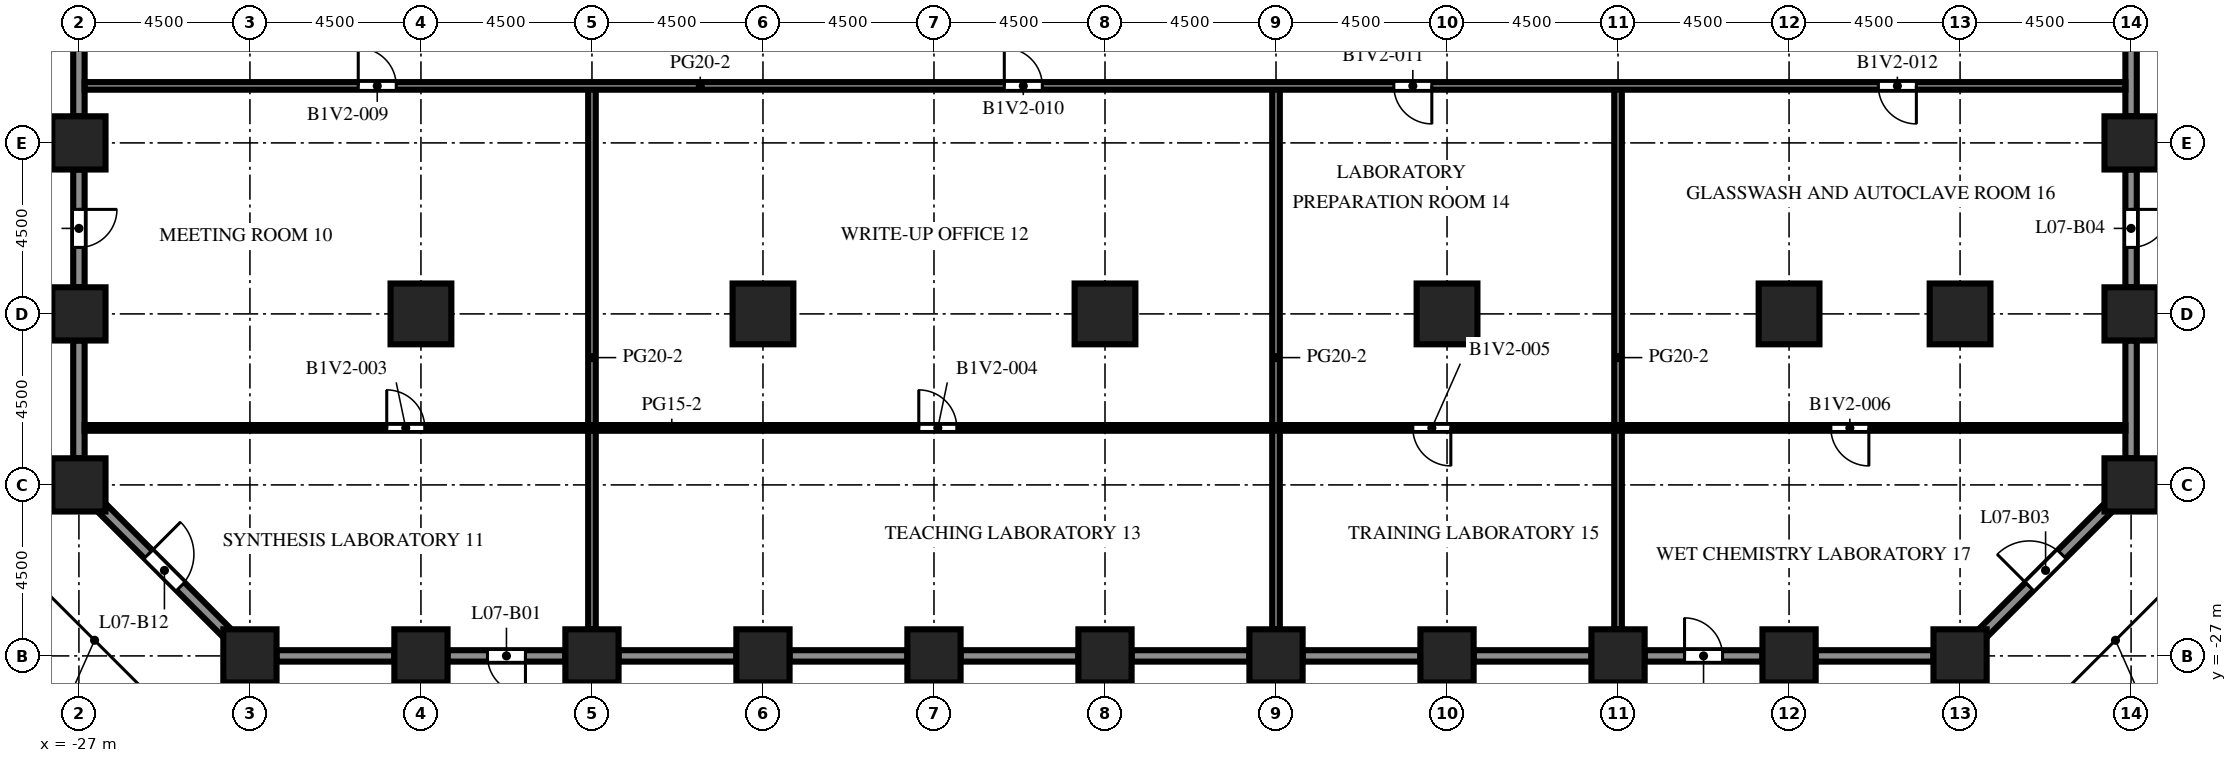
"""IFC4 building model, lengths in metres.
Left out: names, types, materials, properties, quantities, classifications, styles, units other than length and angle.
Written with IfcOpenShell. Run it as: python <this file> out.ifc"""

import sys

from ifc_helpers import new_model, si_unit, direction, frame, frame_2d, origin, origin_2d, place, context, subcontext, project, spatial, rectangle, extrude, element, fill, save


model = new_model("IFC4")
c1 = context("Model", 3, precision=1e-05, world=origin(), true_north=direction((0.0, 1.0)))
c2 = subcontext(c1, "Body", "Model", "MODEL_VIEW")
j1 = project(units=[si_unit("LENGTHUNIT", "METRE"), si_unit("PLANEANGLEUNIT", "RADIAN")], contexts=[c1])
p1 = place(None, origin())
s1 = spatial("IfcSite", under=j1, at=p1, CompositionType="ELEMENT")
p2 = place(p1, origin())
s2 = spatial("IfcBuilding", under=s1, at=p2, CompositionType="ELEMENT")
p3 = place(p2, frame((0.0, 0.0, 31.8)))
s3 = spatial("IfcBuildingStorey", under=s2, at=p3, CompositionType="ELEMENT", Elevation=31.8)
for number, where, z_axis, x_axis in (
    (1, (-27.0, -22.5, 0.0), (0.0, 0.0, 1.0), (1.0, 0.0, 0.0)),
    (2, (-27.0, -18.0, 0.0), (0.0, 0.0, 1.0), (1.0, 0.0, 0.0)),
    (3, (-27.0, -13.5, 0.0), (0.0, 0.0, 1.0), (1.0, 0.0, 0.0)),
    (4, (-22.5, -27.0, 0.0), (0.0, 0.0, 1.0), (1.0, 0.0, 0.0)),
    (5, (-18.0, -27.0, 0.0), (0.0, 0.0, 1.0), (1.0, 0.0, 0.0)),
    (6, (-13.5, -27.0, 0.0), (0.0, 0.0, 1.0), (1.0, 0.0, 0.0)),
    (7, (-9.0, -27.0, 0.0), (0.0, 0.0, 1.0), (1.0, 0.0, 0.0)),
    (8, (-4.5, -27.0, 0.0), (0.0, 0.0, 1.0), (1.0, 0.0, 0.0)),
    (9, (0.0, -27.0, 0.0), (0.0, 0.0, 1.0), (1.0, 0.0, 0.0)),
    (10, (4.5, -27.0, 0.0), (0.0, 0.0, 1.0), (1.0, 0.0, 0.0)),
    (11, (9.0, -27.0, 0.0), (0.0, 0.0, 1.0), (1.0, 0.0, 0.0)),
    (12, (13.5, -27.0, 0.0), (0.0, 0.0, 1.0), (1.0, 0.0, 0.0)),
    (13, (18.0, -27.0, 0.0), (0.0, 0.0, 1.0), (1.0, 0.0, 0.0)),
    (14, (22.5, -27.0, 0.0), (0.0, 0.0, 1.0), (1.0, 0.0, 0.0)),
    (15, (27.0, -22.5, 0.0), (0.0, 0.0, 1.0), (1.0, 0.0, 0.0)),
    (16, (27.0, -18.0, 0.0), (0.0, 0.0, 1.0), (1.0, 0.0, 0.0)),
    (17, (27.0, -13.5, 0.0), (0.0, 0.0, 1.0), (1.0, 0.0, 0.0)),
):
    element("IfcColumn", number, at=place(p3, frame(where, z_axis=z_axis, x_axis=x_axis)), inside=s3, PredefinedType="COLUMN", context=c2, shape_type="SweptSolid", body=[
        extrude(rectangle(XDim=1.4, YDim=1.4, at=origin_2d()), origin(), (0.0, 0.0, 1.0), 4.1),
    ])
for number, where, z_axis, x_axis in (
    (18, (-18.0, -18.0, 0.0), (0.0, 0.0, 1.0), (1.0, 0.0, 0.0)),
    (19, (-9.0, -18.0, 0.0), (0.0, 0.0, 1.0), (1.0, 0.0, 0.0)),
    (20, (0.0, -18.0, 0.0), (0.0, 0.0, 1.0), (1.0, 0.0, 0.0)),
    (21, (9.0, -18.0, 0.0), (0.0, 0.0, 1.0), (1.0, 0.0, 0.0)),
    (22, (18.0, -18.0, 0.0), (0.0, 0.0, 1.0), (1.0, 0.0, 0.0)),
    (23, (22.5, -18.0, 0.0), (0.0, 0.0, 1.0), (1.0, 0.0, 0.0)),
):
    element("IfcColumn", number, at=place(p3, frame(where, z_axis=z_axis, x_axis=x_axis)), inside=s3, PredefinedType="COLUMN", context=c2, shape_type="SweptSolid", body=[
        extrude(rectangle(XDim=1.6, YDim=1.6, at=origin_2d()), origin(), (0.0, 0.0, 1.0), 4.1),
    ])
p4 = place(p3, frame((-18.7, -27.0, 0.0), z_axis=(0.0, 0.0, 1.0), x_axis=(-1.0, 0.0, 0.0)))
e24 = element("IfcWall", 24, at=p4, inside=s3, PredefinedType="SOLIDWALL", context=c2, shape_type="SweptSolid", body=[
    extrude(rectangle(XDim=3.1, YDim=0.3, at=frame_2d((1.55, 0.0))), origin(), (0.0, 0.0, 1.0), 2.6),
])
p5 = place(p3, frame((-14.2, -27.0, 0.0), z_axis=(0.0, 0.0, 1.0), x_axis=(-1.0, 0.0, 0.0)))
e25 = element("IfcWall", 25, at=p5, inside=s3, PredefinedType="SOLIDWALL", context=c2, shape_type="SweptSolid", body=[
    extrude(rectangle(XDim=3.1, YDim=0.3, at=frame_2d((1.55, 0.0))), origin(), (0.0, 0.0, 1.0), 2.6),
])
p6 = place(p5, frame((1.05, 0.0, 0.0)))
e26 = element("IfcOpeningElement", 26, at=p6, cuts=e25, PredefinedType="OPENING", context=c2, shape_type="SweptSolid", body=[
    extrude(rectangle(XDim=1.0, YDim=2.2, at=frame_2d((0.5, 1.1))), frame((0.0, 0.16, 0.0), z_axis=(0.0, -1.0, 0.0), x_axis=(1.0, 0.0, 0.0)), (0.0, 0.0, 1.0), 0.32),
])
for number, where, z_axis, x_axis in (
    (27, (-9.7, -27.0, 0.0), (0.0, 0.0, 1.0), (-1.0, 0.0, 0.0)),
    (28, (-5.2, -27.0, 0.0), (0.0, 0.0, 1.0), (-1.0, 0.0, 0.0)),
    (29, (-0.7, -27.0, 0.0), (0.0, 0.0, 1.0), (-1.0, 0.0, 0.0)),
    (30, (3.8, -27.0, 0.0), (0.0, 0.0, 1.0), (-1.0, 0.0, 0.0)),
    (31, (8.3, -27.0, 0.0), (0.0, 0.0, 1.0), (-1.0, 0.0, 0.0)),
    (32, (12.8, -27.0, 0.0), (0.0, 0.0, 1.0), (-1.0, 0.0, 0.0)),
):
    element("IfcWall", number, at=place(p3, frame(where, z_axis=z_axis, x_axis=x_axis)), inside=s3, PredefinedType="SOLIDWALL", context=c2, shape_type="SweptSolid", body=[
        extrude(rectangle(XDim=3.1, YDim=0.3, at=frame_2d((1.55, 0.0))), origin(), (0.0, 0.0, 1.0), 2.6),
    ])
p7 = place(p3, frame((17.3, -27.0, 0.0), z_axis=(0.0, 0.0, 1.0), x_axis=(-1.0, 0.0, 0.0)))
e33 = element("IfcWall", 33, at=p7, inside=s3, PredefinedType="SOLIDWALL", context=c2, shape_type="SweptSolid", body=[
    extrude(rectangle(XDim=3.1, YDim=0.3, at=frame_2d((1.55, 0.0))), origin(), (0.0, 0.0, 1.0), 2.6),
])
p8 = place(p7, frame((1.05, 0.0, 0.0)))
e34 = element("IfcOpeningElement", 34, at=p8, cuts=e33, PredefinedType="OPENING", context=c2, shape_type="SweptSolid", body=[
    extrude(rectangle(XDim=1.0, YDim=2.2, at=frame_2d((0.5, 1.1))), frame((0.0, 0.16, 0.0), z_axis=(0.0, -1.0, 0.0), x_axis=(1.0, 0.0, 0.0)), (0.0, 0.0, 1.0), 0.32),
])
p9 = place(p3, frame((21.8, -27.0, 0.0), z_axis=(0.0, 0.0, 1.0), x_axis=(-1.0, 0.0, 0.0)))
e35 = element("IfcWall", 35, at=p9, inside=s3, PredefinedType="SOLIDWALL", context=c2, shape_type="SweptSolid", body=[
    extrude(rectangle(XDim=3.1, YDim=0.3, at=frame_2d((1.55, 0.0))), origin(), (0.0, 0.0, 1.0), 2.6),
])
p10 = place(p3, frame((26.406, -23.094, 0.0), z_axis=(0.0, 0.0, 1.0), x_axis=(-0.707106781187, -0.707106781187, 0.0)))
e36 = element("IfcWall", 36, at=p10, inside=s3, PredefinedType="SOLIDWALL", context=c2, shape_type="SweptSolid", body=[
    extrude(rectangle(XDim=4.684, YDim=0.3, at=frame_2d((2.342, 0.0))), origin(), (0.0, 0.0, 1.0), 2.6),
])
p11 = place(p10, frame((1.742, 0.0, 0.0)))
e37 = element("IfcOpeningElement", 37, at=p11, cuts=e36, PredefinedType="OPENING", context=c2, shape_type="SweptSolid", body=[
    extrude(rectangle(XDim=1.2, YDim=2.2, at=frame_2d((0.6, 1.1))), frame((0.0, 0.16, 0.0), z_axis=(0.0, -1.0, 0.0), x_axis=(1.0, 0.0, 0.0)), (0.0, 0.0, 1.0), 0.32),
])
p12 = place(p3, frame((27.0, -18.7, 0.0), z_axis=(0.0, 0.0, 1.0), x_axis=(0.0, -1.0, 0.0)))
e38 = element("IfcWall", 38, at=p12, inside=s3, PredefinedType="SOLIDWALL", context=c2, shape_type="SweptSolid", body=[
    extrude(rectangle(XDim=3.1, YDim=0.3, at=frame_2d((1.55, 0.0))), origin(), (0.0, 0.0, 1.0), 2.6),
])
p13 = place(p3, frame((27.0, -14.2, 0.0), z_axis=(0.0, 0.0, 1.0), x_axis=(0.0, -1.0, 0.0)))
e39 = element("IfcWall", 39, at=p13, inside=s3, PredefinedType="SOLIDWALL", context=c2, shape_type="SweptSolid", body=[
    extrude(rectangle(XDim=3.1, YDim=0.3, at=frame_2d((1.55, 0.0))), origin(), (0.0, 0.0, 1.0), 2.6),
])
p14 = place(p13, frame((1.05, 0.0, 0.0)))
e40 = element("IfcOpeningElement", 40, at=p14, cuts=e39, PredefinedType="OPENING", context=c2, shape_type="SweptSolid", body=[
    extrude(rectangle(XDim=1.0, YDim=2.2, at=frame_2d((0.5, 1.1))), frame((0.0, 0.16, 0.0), z_axis=(0.0, -1.0, 0.0), x_axis=(1.0, 0.0, 0.0)), (0.0, 0.0, 1.0), 0.32),
])
for number, where, z_axis, x_axis in (
    (41, (27.0, -9.7, 0.0), (0.0, 0.0, 1.0), (0.0, -1.0, 0.0)),
    (42, (-27.0, -12.8, 0.0), (0.0, 0.0, 1.0), (0.0, 1.0, 0.0)),
):
    element("IfcWall", number, at=place(p3, frame(where, z_axis=z_axis, x_axis=x_axis)), inside=s3, PredefinedType="SOLIDWALL", context=c2, shape_type="SweptSolid", body=[
        extrude(rectangle(XDim=3.1, YDim=0.3, at=frame_2d((1.55, 0.0))), origin(), (0.0, 0.0, 1.0), 2.6),
    ])
p15 = place(p3, frame((-27.0, -17.3, 0.0), z_axis=(0.0, 0.0, 1.0), x_axis=(0.0, 1.0, 0.0)))
e43 = element("IfcWall", 43, at=p15, inside=s3, PredefinedType="SOLIDWALL", context=c2, shape_type="SweptSolid", body=[
    extrude(rectangle(XDim=3.1, YDim=0.3, at=frame_2d((1.55, 0.0))), origin(), (0.0, 0.0, 1.0), 2.6),
])
p16 = place(p15, frame((1.05, 0.0, 0.0)))
e44 = element("IfcOpeningElement", 44, at=p16, cuts=e43, PredefinedType="OPENING", context=c2, shape_type="SweptSolid", body=[
    extrude(rectangle(XDim=1.0, YDim=2.2, at=frame_2d((0.5, 1.1))), frame((0.0, 0.16, 0.0), z_axis=(0.0, -1.0, 0.0), x_axis=(1.0, 0.0, 0.0)), (0.0, 0.0, 1.0), 0.32),
])
p17 = place(p3, frame((-27.0, -21.8, 0.0), z_axis=(0.0, 0.0, 1.0), x_axis=(0.0, 1.0, 0.0)))
e45 = element("IfcWall", 45, at=p17, inside=s3, PredefinedType="SOLIDWALL", context=c2, shape_type="SweptSolid", body=[
    extrude(rectangle(XDim=3.1, YDim=0.3, at=frame_2d((1.55, 0.0))), origin(), (0.0, 0.0, 1.0), 2.6),
])
p18 = place(p3, frame((-23.094, -26.406, 0.0), z_axis=(0.0, 0.0, 1.0), x_axis=(-0.707106781187, 0.707106781187, 0.0)))
e46 = element("IfcWall", 46, at=p18, inside=s3, PredefinedType="SOLIDWALL", context=c2, shape_type="SweptSolid", body=[
    extrude(rectangle(XDim=4.684, YDim=0.3, at=frame_2d((2.342, 0.0))), origin(), (0.0, 0.0, 1.0), 2.6),
])
p19 = place(p18, frame((1.742, 0.0, 0.0)))
e47 = element("IfcOpeningElement", 47, at=p19, cuts=e46, PredefinedType="OPENING", context=c2, shape_type="SweptSolid", body=[
    extrude(rectangle(XDim=1.2, YDim=2.2, at=frame_2d((0.6, 1.1))), frame((0.0, 0.16, 0.0), z_axis=(0.0, -1.0, 0.0), x_axis=(1.0, 0.0, 0.0)), (0.0, 0.0, 1.0), 0.32),
])
for number, where, z_axis, x_axis in (
    (48, (-13.5, -26.3, 0.0), (0.0, 0.0, 1.0), (0.0, 1.0, 0.0)),
    (49, (4.5, -26.3, 0.0), (0.0, 0.0, 1.0), (0.0, 1.0, 0.0)),
    (50, (13.5, -26.3, 0.0), (0.0, 0.0, 1.0), (0.0, 1.0, 0.0)),
):
    element("IfcWall", number, at=place(p3, frame(where, z_axis=z_axis, x_axis=x_axis)), inside=s3, PredefinedType="PARTITIONING", context=c2, shape_type="SweptSolid", body=[
        extrude(rectangle(XDim=14.3, YDim=0.2, at=frame_2d((7.15, 0.0))), origin(), (0.0, 0.0, 1.0), 3.5),
    ])
p20 = place(p3, frame((26.85, -21.0, 0.0), z_axis=(0.0, 0.0, 1.0), x_axis=(-1.0, 0.0, 0.0)))
e51 = element("IfcWall", 51, at=p20, inside=s3, PredefinedType="PARTITIONING", context=c2, shape_type="SweptSolid", body=[
    extrude(rectangle(XDim=53.7, YDim=0.15, at=frame_2d((26.85, 0.0))), origin(), (0.0, 0.0, 1.0), 3.5),
])
p21 = place(p20, frame((44.75, 0.0, 0.0)))
e52 = element("IfcOpeningElement", 52, at=p21, cuts=e51, PredefinedType="OPENING", context=c2, shape_type="SweptSolid", body=[
    extrude(rectangle(XDim=1.0, YDim=2.1, at=frame_2d((0.5, 1.05))), frame((0.0, 0.085, 0.0), z_axis=(0.0, -1.0, 0.0), x_axis=(1.0, 0.0, 0.0)), (0.0, 0.0, 1.0), 0.17),
])
p22 = place(p20, frame((30.75, 0.0, 0.0)))
e53 = element("IfcOpeningElement", 53, at=p22, cuts=e51, PredefinedType="OPENING", context=c2, shape_type="SweptSolid", body=[
    extrude(rectangle(XDim=1.0, YDim=2.1, at=frame_2d((0.5, 1.05))), frame((0.0, 0.085, 0.0), z_axis=(0.0, -1.0, 0.0), x_axis=(1.0, 0.0, 0.0)), (0.0, 0.0, 1.0), 0.17),
])
p23 = place(p20, frame((17.75, 0.0, 0.0)))
e54 = element("IfcOpeningElement", 54, at=p23, cuts=e51, PredefinedType="OPENING", context=c2, shape_type="SweptSolid", body=[
    extrude(rectangle(XDim=1.0, YDim=2.1, at=frame_2d((0.5, 1.05))), frame((0.0, 0.085, 0.0), z_axis=(0.0, -1.0, 0.0), x_axis=(1.0, 0.0, 0.0)), (0.0, 0.0, 1.0), 0.17),
])
p24 = place(p20, frame((6.75, 0.0, 0.0)))
e55 = element("IfcOpeningElement", 55, at=p24, cuts=e51, PredefinedType="OPENING", context=c2, shape_type="SweptSolid", body=[
    extrude(rectangle(XDim=1.0, YDim=2.1, at=frame_2d((0.5, 1.05))), frame((0.0, 0.085, 0.0), z_axis=(0.0, -1.0, 0.0), x_axis=(1.0, 0.0, 0.0)), (0.0, 0.0, 1.0), 0.17),
])
p25 = place(p3, frame((26.85, -12.0, 0.0), z_axis=(0.0, 0.0, 1.0), x_axis=(-1.0, 0.0, 0.0)))
e56 = element("IfcWall", 56, at=p25, inside=s3, PredefinedType="PARTITIONING", context=c2, shape_type="SweptSolid", body=[
    extrude(rectangle(XDim=53.7, YDim=0.2, at=frame_2d((26.85, 0.0))), origin(), (0.0, 0.0, 1.0), 3.5),
])
p26 = place(p25, frame((45.5, 0.0, 0.0)))
e57 = element("IfcOpeningElement", 57, at=p26, cuts=e56, PredefinedType="OPENING", context=c2, shape_type="SweptSolid", body=[
    extrude(rectangle(XDim=1.0, YDim=2.1, at=frame_2d((0.5, 1.05))), frame((0.0, 0.11, 0.0), z_axis=(0.0, -1.0, 0.0), x_axis=(1.0, 0.0, 0.0)), (0.0, 0.0, 1.0), 0.22),
])
p27 = place(p25, frame((28.5, 0.0, 0.0)))
e58 = element("IfcOpeningElement", 58, at=p27, cuts=e56, PredefinedType="OPENING", context=c2, shape_type="SweptSolid", body=[
    extrude(rectangle(XDim=1.0, YDim=2.1, at=frame_2d((0.5, 1.05))), frame((0.0, 0.11, 0.0), z_axis=(0.0, -1.0, 0.0), x_axis=(1.0, 0.0, 0.0)), (0.0, 0.0, 1.0), 0.22),
])
p28 = place(p25, frame((18.25, 0.0, 0.0)))
e59 = element("IfcOpeningElement", 59, at=p28, cuts=e56, PredefinedType="OPENING", context=c2, shape_type="SweptSolid", body=[
    extrude(rectangle(XDim=1.0, YDim=2.1, at=frame_2d((0.5, 1.05))), frame((0.0, 0.11, 0.0), z_axis=(0.0, -1.0, 0.0), x_axis=(1.0, 0.0, 0.0)), (0.0, 0.0, 1.0), 0.22),
])
p29 = place(p25, frame((5.5, 0.0, 0.0)))
e60 = element("IfcOpeningElement", 60, at=p29, cuts=e56, PredefinedType="OPENING", context=c2, shape_type="SweptSolid", body=[
    extrude(rectangle(XDim=1.0, YDim=2.1, at=frame_2d((0.5, 1.05))), frame((0.0, 0.11, 0.0), z_axis=(0.0, -1.0, 0.0), x_axis=(1.0, 0.0, 0.0)), (0.0, 0.0, 1.0), 0.22),
])
p30 = place(p6, origin())
e61 = element("IfcDoor", 61, at=p30, inside=s3, OperationType="SINGLE_SWING_LEFT", PredefinedType="DOOR", context=c2, shape_type="SweptSolid", body=[
    extrude(rectangle(XDim=1.0, YDim=2.2, at=frame_2d((0.5, 1.1))), frame((0.0, 0.025, 0.0), z_axis=(0.0, -1.0, 0.0), x_axis=(1.0, 0.0, 0.0)), (0.0, 0.0, 1.0), 0.05),
])
fill(e26, e61)
p31 = place(p8, origin())
e62 = element("IfcDoor", 62, at=p31, inside=s3, OperationType="SINGLE_SWING_RIGHT", PredefinedType="DOOR", context=c2, shape_type="SweptSolid", body=[
    extrude(rectangle(XDim=1.0, YDim=2.2, at=frame_2d((0.5, 1.1))), frame((0.0, 0.025, 0.0), z_axis=(0.0, -1.0, 0.0), x_axis=(1.0, 0.0, 0.0)), (0.0, 0.0, 1.0), 0.05),
])
fill(e34, e62)
p32 = place(p11, origin())
e63 = element("IfcDoor", 63, at=p32, inside=s3, OperationType="SINGLE_SWING_RIGHT", PredefinedType="DOOR", context=c2, shape_type="SweptSolid", body=[
    extrude(rectangle(XDim=1.2, YDim=2.2, at=frame_2d((0.6, 1.1))), frame((0.0, 0.025, 0.0), z_axis=(0.0, -1.0, 0.0), x_axis=(1.0, 0.0, 0.0)), (0.0, 0.0, 1.0), 0.05),
])
fill(e37, e63)
p33 = place(p14, origin())
e64 = element("IfcDoor", 64, at=p33, inside=s3, OperationType="SINGLE_SWING_LEFT", PredefinedType="DOOR", context=c2, shape_type="SweptSolid", body=[
    extrude(rectangle(XDim=1.0, YDim=2.2, at=frame_2d((0.5, 1.1))), frame((0.0, 0.025, 0.0), z_axis=(0.0, -1.0, 0.0), x_axis=(1.0, 0.0, 0.0)), (0.0, 0.0, 1.0), 0.05),
])
fill(e40, e64)
p34 = place(p16, origin())
e65 = element("IfcDoor", 65, at=p34, inside=s3, OperationType="SINGLE_SWING_RIGHT", PredefinedType="DOOR", context=c2, shape_type="SweptSolid", body=[
    extrude(rectangle(XDim=1.0, YDim=2.2, at=frame_2d((0.5, 1.1))), frame((0.0, 0.025, 0.0), z_axis=(0.0, -1.0, 0.0), x_axis=(1.0, 0.0, 0.0)), (0.0, 0.0, 1.0), 0.05),
])
fill(e44, e65)
p35 = place(p19, origin())
e66 = element("IfcDoor", 66, at=p35, inside=s3, OperationType="SINGLE_SWING_RIGHT", PredefinedType="DOOR", context=c2, shape_type="SweptSolid", body=[
    extrude(rectangle(XDim=1.2, YDim=2.2, at=frame_2d((0.6, 1.1))), frame((0.0, 0.025, 0.0), z_axis=(0.0, -1.0, 0.0), x_axis=(1.0, 0.0, 0.0)), (0.0, 0.0, 1.0), 0.05),
])
fill(e47, e66)
p36 = place(p21, origin())
e67 = element("IfcDoor", 67, at=p36, inside=s3, OperationType="SINGLE_SWING_RIGHT", PredefinedType="DOOR", context=c2, shape_type="SweptSolid", body=[
    extrude(rectangle(XDim=1.0, YDim=2.1, at=frame_2d((0.5, 1.05))), frame((0.0, 0.025, 0.0), z_axis=(0.0, -1.0, 0.0), x_axis=(1.0, 0.0, 0.0)), (0.0, 0.0, 1.0), 0.05),
])
fill(e52, e67)
p37 = place(p22, origin())
e68 = element("IfcDoor", 68, at=p37, inside=s3, OperationType="SINGLE_SWING_RIGHT", PredefinedType="DOOR", context=c2, shape_type="SweptSolid", body=[
    extrude(rectangle(XDim=1.0, YDim=2.1, at=frame_2d((0.5, 1.05))), frame((0.0, 0.025, 0.0), z_axis=(0.0, -1.0, 0.0), x_axis=(1.0, 0.0, 0.0)), (0.0, 0.0, 1.0), 0.05),
])
fill(e53, e68)
p38 = place(p23, origin())
e69 = element("IfcDoor", 69, at=p38, inside=s3, OperationType="SINGLE_SWING_LEFT", PredefinedType="DOOR", context=c2, shape_type="SweptSolid", body=[
    extrude(rectangle(XDim=1.0, YDim=2.1, at=frame_2d((0.5, 1.05))), frame((0.0, 0.025, 0.0), z_axis=(0.0, -1.0, 0.0), x_axis=(1.0, 0.0, 0.0)), (0.0, 0.0, 1.0), 0.05),
])
fill(e54, e69)
p39 = place(p24, origin())
e70 = element("IfcDoor", 70, at=p39, inside=s3, OperationType="SINGLE_SWING_LEFT", PredefinedType="DOOR", context=c2, shape_type="SweptSolid", body=[
    extrude(rectangle(XDim=1.0, YDim=2.1, at=frame_2d((0.5, 1.05))), frame((0.0, 0.025, 0.0), z_axis=(0.0, -1.0, 0.0), x_axis=(1.0, 0.0, 0.0)), (0.0, 0.0, 1.0), 0.05),
])
fill(e55, e70)
p40 = place(p26, origin())
e71 = element("IfcDoor", 71, at=p40, inside=s3, OperationType="SINGLE_SWING_RIGHT", PredefinedType="DOOR", context=c2, shape_type="SweptSolid", body=[
    extrude(rectangle(XDim=1.0, YDim=2.1, at=frame_2d((0.5, 1.05))), frame((0.0, 0.025, 0.0), z_axis=(0.0, -1.0, 0.0), x_axis=(1.0, 0.0, 0.0)), (0.0, 0.0, 1.0), 0.05),
])
fill(e57, e71)
p41 = place(p27, origin())
e72 = element("IfcDoor", 72, at=p41, inside=s3, OperationType="SINGLE_SWING_RIGHT", PredefinedType="DOOR", context=c2, shape_type="SweptSolid", body=[
    extrude(rectangle(XDim=1.0, YDim=2.1, at=frame_2d((0.5, 1.05))), frame((0.0, 0.025, 0.0), z_axis=(0.0, -1.0, 0.0), x_axis=(1.0, 0.0, 0.0)), (0.0, 0.0, 1.0), 0.05),
])
fill(e58, e72)
p42 = place(p28, origin())
e73 = element("IfcDoor", 73, at=p42, inside=s3, OperationType="SINGLE_SWING_LEFT", PredefinedType="DOOR", context=c2, shape_type="SweptSolid", body=[
    extrude(rectangle(XDim=1.0, YDim=2.1, at=frame_2d((0.5, 1.05))), frame((0.0, 0.025, 0.0), z_axis=(0.0, -1.0, 0.0), x_axis=(1.0, 0.0, 0.0)), (0.0, 0.0, 1.0), 0.05),
])
fill(e59, e73)
p43 = place(p29, origin())
e74 = element("IfcDoor", 74, at=p43, inside=s3, OperationType="SINGLE_SWING_LEFT", PredefinedType="DOOR", context=c2, shape_type="SweptSolid", body=[
    extrude(rectangle(XDim=1.0, YDim=2.1, at=frame_2d((0.5, 1.05))), frame((0.0, 0.025, 0.0), z_axis=(0.0, -1.0, 0.0), x_axis=(1.0, 0.0, 0.0)), (0.0, 0.0, 1.0), 0.05),
])
fill(e60, e74)
save(model, sys.argv[1])
